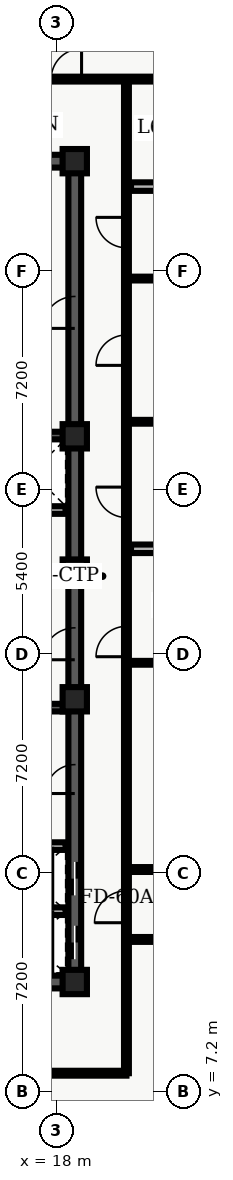
"""IFC4 building model, lengths in metres.
Left out: names, types, materials, properties, quantities, classifications, styles, units other than length and angle.
Written with IfcOpenShell. Run it as: python <this file> out.ifc"""

import sys

from ifc_helpers import new_model, entity, si_unit, converted_unit, direction, frame, origin_with_axes, origin_2d_with_axis, place, context, subcontext, project, spatial, polyline, rectangle, outline, extrude, element, fill, save


model = new_model("IFC4")
c1 = context("Model", 3, precision=1e-05, world=origin_with_axes(), true_north=direction((0.0, 1.0)))
c2 = subcontext(c1, "Body", "Model", "MODEL_VIEW")
j1 = project(units=[si_unit("LENGTHUNIT", "METRE"), converted_unit("PLANEANGLEUNIT", "DEGREE", entity("IfcPlaneAngleMeasure", 0.017), si_unit("PLANEANGLEUNIT", "RADIAN"), dimensions=[0, 0, 0, 0, 0, 0, 0])], contexts=[c1])
p1 = place(None, origin_with_axes())
s1 = spatial("IfcSite", under=j1, at=p1, CompositionType="ELEMENT")
p2 = place(p1, origin_with_axes())
s2 = spatial("IfcBuilding", under=s1, at=p2, CompositionType="ELEMENT")
p3 = place(p2, frame((0.0, 0.0, 264.6), z_axis=(0.0, 0.0, 1.0), x_axis=(1.0, 0.0, 0.0)))
s3 = spatial("IfcBuildingStorey", under=s2, at=p3, CompositionType="ELEMENT", Elevation=264.6)
p4 = place(p3, frame((11.4, 10.8, 0.0), z_axis=(0.0, 0.0, 1.0), x_axis=(1.0, 0.0, 0.0)))
e1 = element("IfcWall", 1, at=p4, inside=s3, PredefinedType="SHEAR", context=c2, shape_type="SweptSolid", body=[
    extrude(outline(polyline([(0.0, -0.21), (7.2, -0.21), (7.2, 0.21), (0.0, 0.21), (0.0, -0.21)])), origin_with_axes(), (0.0, 0.0, 1.0), 3.66),
])
p5 = place(p4, frame((2.625, 0.0, 0.0), z_axis=(0.0, 0.0, 1.0), x_axis=(1.0, 0.0, 0.0)))
e2 = element("IfcOpeningElement", 2, at=p5, cuts=e1, PredefinedType="OPENING", context=c2, shape_type="SweptSolid", body=[
    extrude(rectangle(XDim=1.05, YDim=0.44, at=origin_2d_with_axis()), origin_with_axes(), (0.0, 0.0, 1.0), 2.15),
])
p6 = place(p3, frame((11.4, 37.8, 0.0), z_axis=(0.0, 0.0, 1.0), x_axis=(1.0, 0.0, 0.0)))
e3 = element("IfcWall", 3, at=p6, inside=s3, PredefinedType="SHEAR", context=c2, shape_type="SweptSolid", body=[
    extrude(outline(polyline([(0.0, -0.21), (7.2, -0.21), (7.2, 0.21), (0.0, 0.21), (0.0, -0.21)])), origin_with_axes(), (0.0, 0.0, 1.0), 3.66),
])
p7 = place(p6, frame((2.625, 0.0, 0.0), z_axis=(0.0, 0.0, 1.0), x_axis=(1.0, 0.0, 0.0)))
e4 = element("IfcOpeningElement", 4, at=p7, cuts=e3, PredefinedType="OPENING", context=c2, shape_type="SweptSolid", body=[
    extrude(rectangle(XDim=1.05, YDim=0.44, at=origin_2d_with_axis()), origin_with_axes(), (0.0, 0.0, 1.0), 2.15),
])
p8 = place(p3, frame((18.6, 10.8, 0.0), z_axis=(0.0, 0.0, 1.0), x_axis=(0.0, 1.0, 0.0)))
e5 = element("IfcWall", 5, at=p8, inside=s3, PredefinedType="SHEAR", context=c2, shape_type="SweptSolid", body=[
    extrude(outline(polyline([(0.0, -0.21), (13.5, -0.21), (13.5, 0.21), (0.0, 0.21), (0.0, -0.21)])), origin_with_axes(), (0.0, 0.0, 1.0), 3.66),
])
p9 = place(p8, frame((1.3, 0.0, 0.0), z_axis=(0.0, 0.0, 1.0), x_axis=(1.0, 0.0, 0.0)))
e6 = element("IfcOpeningElement", 6, at=p9, cuts=e5, PredefinedType="OPENING", context=c2, shape_type="SweptSolid", body=[
    extrude(rectangle(XDim=1.1, YDim=0.44, at=origin_2d_with_axis()), origin_with_axes(), (0.0, 0.0, 1.0), 2.15),
])
p10 = place(p8, frame((3.4, 0.0, 0.0), z_axis=(0.0, 0.0, 1.0), x_axis=(1.0, 0.0, 0.0)))
e7 = element("IfcOpeningElement", 7, at=p10, cuts=e5, PredefinedType="OPENING", context=c2, shape_type="SweptSolid", body=[
    extrude(rectangle(XDim=1.1, YDim=0.44, at=origin_2d_with_axis()), origin_with_axes(), (0.0, 0.0, 1.0), 2.15),
])
p11 = place(p8, frame((11.125, 0.0, 0.0), z_axis=(0.0, 0.0, 1.0), x_axis=(1.0, 0.0, 0.0)))
e8 = element("IfcOpeningElement", 8, at=p11, cuts=e5, PredefinedType="OPENING", context=c2, shape_type="SweptSolid", body=[
    extrude(rectangle(XDim=1.05, YDim=0.44, at=origin_2d_with_axis()), origin_with_axes(), (0.0, 0.0, 1.0), 2.15),
])
p12 = place(p8, frame((6.675, 0.0, 0.0), z_axis=(0.0, 0.0, 1.0), x_axis=(1.0, 0.0, 0.0)))
e9 = element("IfcOpeningElement", 9, at=p12, cuts=e5, PredefinedType="OPENING", context=c2, shape_type="SweptSolid", body=[
    extrude(rectangle(XDim=0.95, YDim=0.44, at=origin_2d_with_axis()), origin_with_axes(), (0.0, 0.0, 1.0), 2.15),
])
p13 = place(p3, frame((18.6, 24.3, 0.0), z_axis=(0.0, 0.0, 1.0), x_axis=(0.0, 1.0, 0.0)))
e10 = element("IfcWall", 10, at=p13, inside=s3, PredefinedType="SHEAR", context=c2, shape_type="SweptSolid", body=[
    extrude(outline(polyline([(0.0, -0.21), (13.5, -0.21), (13.5, 0.21), (0.0, 0.21), (0.0, -0.21)])), origin_with_axes(), (0.0, 0.0, 1.0), 3.66),
])
p14 = place(p13, frame((8.525, 0.0, 0.0), z_axis=(0.0, 0.0, 1.0), x_axis=(1.0, 0.0, 0.0)))
e11 = element("IfcOpeningElement", 11, at=p14, cuts=e10, PredefinedType="OPENING", context=c2, shape_type="SweptSolid", body=[
    extrude(rectangle(XDim=1.05, YDim=0.44, at=origin_2d_with_axis()), origin_with_axes(), (0.0, 0.0, 1.0), 2.15),
])
for number, where, z_axis, x_axis in (
    (12, (11.61, 19.825, 0.0), (0.0, 0.0, 1.0), (1.0, 0.0, 0.0)),
    (13, (11.61, 28.775, 0.0), (0.0, 0.0, 1.0), (1.0, 0.0, 0.0)),
):
    element("IfcWall", number, at=place(p3, frame(where, z_axis=z_axis, x_axis=x_axis)), inside=s3, PredefinedType="SHEAR", context=c2, shape_type="SweptSolid", body=[
        extrude(outline(polyline([(0.0, -0.125), (6.78, -0.125), (6.78, 0.125), (0.0, 0.125), (0.0, -0.125)])), origin_with_axes(), (0.0, 0.0, 1.0), 3.66),
    ])
p15 = place(p3, frame((11.7, 24.1, 0.0), z_axis=(0.0, 0.0, 1.0), x_axis=(1.0, 0.0, 0.0)))
e14 = element("IfcWall", 14, at=p15, inside=s3, PredefinedType="SOLIDWALL", context=c2, shape_type="SweptSolid", body=[
    extrude(outline(polyline([(0.0, -0.125), (6.6, -0.125), (6.6, 0.125), (0.0, 0.125), (0.0, -0.125)])), origin_with_axes(), (0.0, 0.0, 1.0), 2.7),
])
p16 = place(p15, frame((3.75, 0.0, 0.0), z_axis=(0.0, 0.0, 1.0), x_axis=(1.0, 0.0, 0.0)))
e15 = element("IfcOpeningElement", 15, at=p16, cuts=e14, PredefinedType="OPENING", context=c2, shape_type="SweptSolid", body=[
    extrude(rectangle(XDim=0.9, YDim=0.27, at=origin_2d_with_axis()), origin_with_axes(), (0.0, 0.0, 1.0), 2.15),
])
p17 = place(p3, frame((11.7, 26.325, 0.0), z_axis=(0.0, 0.0, 1.0), x_axis=(1.0, 0.0, 0.0)))
e16 = element("IfcWall", 16, at=p17, inside=s3, PredefinedType="SOLIDWALL", context=c2, shape_type="SweptSolid", body=[
    extrude(outline(polyline([(0.0, -0.125), (6.6, -0.125), (6.6, 0.125), (0.0, 0.125), (0.0, -0.125)])), origin_with_axes(), (0.0, 0.0, 1.0), 2.7),
])
p18 = place(p17, frame((3.5, 0.0, 0.0), z_axis=(0.0, 0.0, 1.0), x_axis=(1.0, 0.0, 0.0)))
e17 = element("IfcOpeningElement", 17, at=p18, cuts=e16, PredefinedType="OPENING", context=c2, shape_type="SweptSolid", body=[
    extrude(rectangle(XDim=0.9, YDim=0.27, at=origin_2d_with_axis()), origin_with_axes(), (0.0, 0.0, 1.0), 2.15),
])
for number, where, z_axis, x_axis in (
    (18, (18.6, 10.8, 0.0), (0.0, 0.0, 1.0), (1.0, 0.0, 0.0)),
    (19, (18.6, 20.1, 0.0), (0.0, 0.0, 1.0), (1.0, 0.0, 0.0)),
    (20, (18.6, 24.3, 0.0), (0.0, 0.0, 1.0), (1.0, 0.0, 0.0)),
    (21, (18.6, 28.75, 0.0), (0.0, 0.0, 1.0), (1.0, 0.0, 0.0)),
    (22, (18.6, 37.8, 0.0), (0.0, 0.0, 1.0), (1.0, 0.0, 0.0)),
):
    element("IfcColumn", number, at=place(p3, frame(where, z_axis=z_axis, x_axis=x_axis)), inside=s3, PredefinedType="COLUMN", context=c2, shape_type="SweptSolid", body=[
        extrude(rectangle(XDim=0.8, YDim=0.8, at=origin_2d_with_axis()), origin_with_axes(), (0.0, 0.0, 1.0), 3.9),
    ])
for number, where, z_axis, x_axis in (
    (23, (15.84, 13.13, 0.0), (0.0, 0.0, 1.0), (1.0, 0.0, 0.0)),
    (24, (15.84, 15.27, 0.0), (0.0, 0.0, 1.0), (1.0, 0.0, 0.0)),
):
    element("IfcWall", number, at=place(p3, frame(where, z_axis=z_axis, x_axis=x_axis)), inside=s3, PredefinedType="SOLIDWALL", context=c2, shape_type="SweptSolid", body=[
        extrude(outline(polyline([(0.0, -0.125), (2.46, -0.125), (2.46, 0.125), (0.0, 0.125), (0.0, -0.125)])), origin_with_axes(), (0.0, 0.0, 1.0), 2.7),
    ])
p19 = place(p3, frame((8.135, 7.8, 0.0), z_axis=(0.0, 0.0, 1.0), x_axis=(1.0, 0.0, 0.0)))
e25 = element("IfcWall", 25, at=p19, inside=s3, PredefinedType="PARTITIONING", context=c2, shape_type="SweptSolid", body=[
    extrude(outline(polyline([(0.0, -0.08), (12.165, -0.08), (12.165, 0.08), (0.0, 0.08), (0.0, -0.08)])), origin_with_axes(), (0.0, 0.0, 1.0), 2.7),
])
p20 = place(p19, frame((3.994, 0.0, 0.0), z_axis=(0.0, 0.0, 1.0), x_axis=(1.0, 0.0, 0.0)))
e26 = element("IfcOpeningElement", 26, at=p20, cuts=e25, PredefinedType="OPENING", context=c2, shape_type="SweptSolid", body=[
    extrude(rectangle(XDim=1.0, YDim=0.18, at=origin_2d_with_axis()), origin_with_axes(), (0.0, 0.0, 1.0), 2.15),
])
p21 = place(p19, frame((8.794, 0.0, 0.0), z_axis=(0.0, 0.0, 1.0), x_axis=(1.0, 0.0, 0.0)))
e27 = element("IfcOpeningElement", 27, at=p21, cuts=e25, PredefinedType="OPENING", context=c2, shape_type="SweptSolid", body=[
    extrude(rectangle(XDim=1.0, YDim=0.18, at=origin_2d_with_axis()), origin_with_axes(), (0.0, 0.0, 1.0), 2.15),
])
p22 = place(p3, frame((8.135, 40.5, 0.0), z_axis=(0.0, 0.0, 1.0), x_axis=(1.0, 0.0, 0.0)))
e28 = element("IfcWall", 28, at=p22, inside=s3, PredefinedType="PARTITIONING", context=c2, shape_type="SweptSolid", body=[
    extrude(outline(polyline([(0.0, -0.08), (23.93, -0.08), (23.93, 0.08), (0.0, 0.08), (0.0, -0.08)])), origin_with_axes(), (0.0, 0.0, 1.0), 2.7),
])
p23 = place(p22, frame((0.76, 0.0, 0.0), z_axis=(0.0, 0.0, 1.0), x_axis=(1.0, 0.0, 0.0)))
e29 = element("IfcOpeningElement", 29, at=p23, cuts=e28, PredefinedType="OPENING", context=c2, shape_type="SweptSolid", body=[
    extrude(rectangle(XDim=1.0, YDim=0.18, at=origin_2d_with_axis()), origin_with_axes(), (0.0, 0.0, 1.0), 2.15),
])
p24 = place(p22, frame((4.729, 0.0, 0.0), z_axis=(0.0, 0.0, 1.0), x_axis=(1.0, 0.0, 0.0)))
e30 = element("IfcOpeningElement", 30, at=p24, cuts=e28, PredefinedType="OPENING", context=c2, shape_type="SweptSolid", body=[
    extrude(rectangle(XDim=1.0, YDim=0.18, at=origin_2d_with_axis()), origin_with_axes(), (0.0, 0.0, 1.0), 2.15),
])
p25 = place(p22, frame((7.574, 0.0, 0.0), z_axis=(0.0, 0.0, 1.0), x_axis=(1.0, 0.0, 0.0)))
e31 = element("IfcOpeningElement", 31, at=p25, cuts=e28, PredefinedType="OPENING", context=c2, shape_type="SweptSolid", body=[
    extrude(rectangle(XDim=1.0, YDim=0.18, at=origin_2d_with_axis()), origin_with_axes(), (0.0, 0.0, 1.0), 2.15),
])
p26 = place(p22, frame((10.189, 0.0, 0.0), z_axis=(0.0, 0.0, 1.0), x_axis=(1.0, 0.0, 0.0)))
e32 = element("IfcOpeningElement", 32, at=p26, cuts=e28, PredefinedType="OPENING", context=c2, shape_type="SweptSolid", body=[
    extrude(rectangle(XDim=1.0, YDim=0.18, at=origin_2d_with_axis()), origin_with_axes(), (0.0, 0.0, 1.0), 2.15),
])
p27 = place(p3, frame((20.3, 7.8, 0.0), z_axis=(0.0, 0.0, 1.0), x_axis=(0.0, 1.0, 0.0)))
e33 = element("IfcWall", 33, at=p27, inside=s3, PredefinedType="PARTITIONING", context=c2, shape_type="SweptSolid", body=[
    extrude(outline(polyline([(0.0, -0.08), (32.7, -0.08), (32.7, 0.08), (0.0, 0.08), (0.0, -0.08)])), origin_with_axes(), (0.0, 0.0, 1.0), 2.7),
])
p28 = place(p27, frame((14.2, 0.0, 0.0), z_axis=(0.0, 0.0, 1.0), x_axis=(1.0, 0.0, 0.0)))
e34 = element("IfcOpeningElement", 34, at=p28, cuts=e33, PredefinedType="OPENING", context=c2, shape_type="SweptSolid", body=[
    extrude(rectangle(XDim=1.0, YDim=0.18, at=origin_2d_with_axis()), origin_with_axes(), (0.0, 0.0, 1.0), 2.15),
])
p29 = place(p27, frame((18.779, 0.0, 0.0), z_axis=(0.0, 0.0, 1.0), x_axis=(1.0, 0.0, 0.0)))
e35 = element("IfcOpeningElement", 35, at=p29, cuts=e33, PredefinedType="OPENING", context=c2, shape_type="SweptSolid", body=[
    extrude(rectangle(XDim=1.0, YDim=0.18, at=origin_2d_with_axis()), origin_with_axes(), (0.0, 0.0, 1.0), 2.15),
])
p30 = place(p27, frame((23.784, 0.0, 0.0), z_axis=(0.0, 0.0, 1.0), x_axis=(1.0, 0.0, 0.0)))
e36 = element("IfcOpeningElement", 36, at=p30, cuts=e33, PredefinedType="OPENING", context=c2, shape_type="SweptSolid", body=[
    extrude(rectangle(XDim=1.0, YDim=0.18, at=origin_2d_with_axis()), origin_with_axes(), (0.0, 0.0, 1.0), 2.15),
])
p31 = place(p27, frame((27.651, 0.0, 0.0), z_axis=(0.0, 0.0, 1.0), x_axis=(1.0, 0.0, 0.0)))
e37 = element("IfcOpeningElement", 37, at=p31, cuts=e33, PredefinedType="OPENING", context=c2, shape_type="SweptSolid", body=[
    extrude(rectangle(XDim=1.0, YDim=0.18, at=origin_2d_with_axis()), origin_with_axes(), (0.0, 0.0, 1.0), 2.15),
])
p32 = place(p27, frame((5.475, 0.0, 0.0), z_axis=(0.0, 0.0, 1.0), x_axis=(1.0, 0.0, 0.0)))
e38 = element("IfcOpeningElement", 38, at=p32, cuts=e33, PredefinedType="OPENING", context=c2, shape_type="SweptSolid", body=[
    extrude(rectangle(XDim=1.05, YDim=0.18, at=origin_2d_with_axis()), origin_with_axes(), (0.0, 0.0, 1.0), 2.15),
])
p33 = place(p3, frame((20.45, 25.05, 0.0), z_axis=(0.0, 0.0, 1.0), x_axis=(1.0, 0.0, 0.0)))
e39 = element("IfcWall", 39, at=p33, inside=s3, PredefinedType="PARTITIONING", context=c2, shape_type="SweptSolid", body=[
    extrude(outline(polyline([(0.0, -0.14), (11.615, -0.14), (11.615, 0.14), (0.0, 0.14), (0.0, -0.14)])), origin_with_axes(), (0.0, 0.0, 1.0), 2.7),
])
for number, where, z_axis, x_axis in (
    (40, (20.45, 29.228, 0.0), (0.0, 0.0, 1.0), (1.0, 0.0, 0.0)),
    (41, (20.45, 33.939, 0.0), (0.0, 0.0, 1.0), (1.0, 0.0, 0.0)),
):
    element("IfcWall", number, at=place(p3, frame(where, z_axis=z_axis, x_axis=x_axis)), inside=s3, PredefinedType="PARTITIONING", context=c2, shape_type="SweptSolid", body=[
        extrude(outline(polyline([(0.0, -0.062), (11.615, -0.062), (11.615, 0.062), (0.0, 0.062), (0.0, -0.062)])), origin_with_axes(), (0.0, 0.0, 1.0), 2.7),
    ])
p34 = place(p3, frame((20.45, 36.964, 0.0), z_axis=(0.0, 0.0, 1.0), x_axis=(1.0, 0.0, 0.0)))
e42 = element("IfcWall", 42, at=p34, inside=s3, PredefinedType="PARTITIONING", context=c2, shape_type="SweptSolid", body=[
    extrude(outline(polyline([(0.0, -0.14), (11.615, -0.14), (11.615, 0.14), (0.0, 0.14), (0.0, -0.14)])), origin_with_axes(), (0.0, 0.0, 1.0), 2.7),
])
p35 = place(p34, frame((3.375, 0.0, 0.0), z_axis=(0.0, 0.0, 1.0), x_axis=(1.0, 0.0, 0.0)))
e43 = element("IfcOpeningElement", 43, at=p35, cuts=e42, PredefinedType="OPENING", context=c2, shape_type="SweptSolid", body=[
    extrude(rectangle(XDim=0.95, YDim=0.3, at=origin_2d_with_axis()), origin_with_axes(), (0.0, 0.0, 1.0), 2.15),
])
p36 = place(p3, frame((20.3, 12.2, 0.0), z_axis=(0.0, 0.0, 1.0), x_axis=(1.0, 0.0, 0.0)))
e44 = element("IfcWall", 44, at=p36, inside=s3, PredefinedType="PARTITIONING", context=c2, shape_type="SweptSolid", body=[
    extrude(outline(polyline([(0.0, -0.08), (14.85, -0.08), (14.85, 0.08), (0.0, 0.08), (0.0, -0.08)])), origin_with_axes(), (0.0, 0.0, 1.0), 2.7),
])
p37 = place(p36, frame((8.355, 0.0, 0.0), z_axis=(0.0, 0.0, 1.0), x_axis=(1.0, 0.0, 0.0)))
e45 = element("IfcOpeningElement", 45, at=p37, cuts=e44, PredefinedType="OPENING", context=c2, shape_type="SweptSolid", body=[
    extrude(rectangle(XDim=1.0, YDim=0.18, at=origin_2d_with_axis()), origin_with_axes(), (0.0, 0.0, 1.0), 2.15),
])
p38 = place(p3, frame((20.3, 14.5, 0.0), z_axis=(0.0, 0.0, 1.0), x_axis=(1.0, 0.0, 0.0)))
e46 = element("IfcWall", 46, at=p38, inside=s3, PredefinedType="PARTITIONING", context=c2, shape_type="SweptSolid", body=[
    extrude(outline(polyline([(0.0, -0.08), (14.85, -0.08), (14.85, 0.08), (0.0, 0.08), (0.0, -0.08)])), origin_with_axes(), (0.0, 0.0, 1.0), 2.7),
])
p39 = place(p38, frame((1.739, 0.0, 0.0), z_axis=(0.0, 0.0, 1.0), x_axis=(1.0, 0.0, 0.0)))
e47 = element("IfcOpeningElement", 47, at=p39, cuts=e46, PredefinedType="OPENING", context=c2, shape_type="SweptSolid", body=[
    extrude(rectangle(XDim=1.0, YDim=0.18, at=origin_2d_with_axis()), origin_with_axes(), (0.0, 0.0, 1.0), 2.15),
])
p40 = place(p38, frame((5.299, 0.0, 0.0), z_axis=(0.0, 0.0, 1.0), x_axis=(1.0, 0.0, 0.0)))
e48 = element("IfcOpeningElement", 48, at=p40, cuts=e46, PredefinedType="OPENING", context=c2, shape_type="SweptSolid", body=[
    extrude(rectangle(XDim=1.0, YDim=0.18, at=origin_2d_with_axis()), origin_with_axes(), (0.0, 0.0, 1.0), 2.15),
])
p41 = place(p38, frame((8.889, 0.0, 0.0), z_axis=(0.0, 0.0, 1.0), x_axis=(1.0, 0.0, 0.0)))
e49 = element("IfcOpeningElement", 49, at=p41, cuts=e46, PredefinedType="OPENING", context=c2, shape_type="SweptSolid", body=[
    extrude(rectangle(XDim=1.0, YDim=0.18, at=origin_2d_with_axis()), origin_with_axes(), (0.0, 0.0, 1.0), 2.15),
])
p42 = place(p38, frame((12.624, 0.0, 0.0), z_axis=(0.0, 0.0, 1.0), x_axis=(1.0, 0.0, 0.0)))
e50 = element("IfcOpeningElement", 50, at=p42, cuts=e46, PredefinedType="OPENING", context=c2, shape_type="SweptSolid", body=[
    extrude(rectangle(XDim=1.0, YDim=0.18, at=origin_2d_with_axis()), origin_with_axes(), (0.0, 0.0, 1.0), 2.15),
])
p43 = place(p3, frame((20.3, 21.3, 0.0), z_axis=(0.0, 0.0, 1.0), x_axis=(1.0, 0.0, 0.0)))
e51 = element("IfcWall", 51, at=p43, inside=s3, PredefinedType="PARTITIONING", context=c2, shape_type="SweptSolid", body=[
    extrude(outline(polyline([(0.0, -0.062), (11.765, -0.062), (11.765, 0.062), (0.0, 0.062), (0.0, -0.062)])), origin_with_axes(), (0.0, 0.0, 1.0), 2.7),
])
p44 = place(p8, frame((1.3, 0.0, 0.0), z_axis=(0.0, 0.0, 1.0), x_axis=(1.0, 0.0, 0.0)))
e52 = element("IfcDoor", 52, at=p44, inside=s3, OperationType="SLIDING_TO_LEFT", PredefinedType="DOOR", context=c2, shape_type="SweptSolid", body=[
    extrude(rectangle(XDim=1.1, YDim=0.09, at=origin_2d_with_axis()), origin_with_axes(), (0.0, 0.0, 1.0), 2.15),
])
fill(e6, e52)
p45 = place(p8, frame((3.4, 0.0, 0.0), z_axis=(0.0, 0.0, 1.0), x_axis=(1.0, 0.0, 0.0)))
e53 = element("IfcDoor", 53, at=p45, inside=s3, OperationType="SLIDING_TO_RIGHT", PredefinedType="DOOR", context=c2, shape_type="SweptSolid", body=[
    extrude(rectangle(XDim=1.1, YDim=0.09, at=origin_2d_with_axis()), origin_with_axes(), (0.0, 0.0, 1.0), 2.15),
])
fill(e7, e53)
p46 = place(p8, frame((11.125, 0.0, 0.0), z_axis=(0.0, 0.0, 1.0), x_axis=(1.0, 0.0, 0.0)))
e54 = element("IfcDoor", 54, at=p46, inside=s3, OperationType="SINGLE_SWING_LEFT", PredefinedType="DOOR", context=c2, shape_type="SweptSolid", body=[
    extrude(rectangle(XDim=1.05, YDim=0.09, at=origin_2d_with_axis()), origin_with_axes(), (0.0, 0.0, 1.0), 2.15),
])
fill(e8, e54)
p47 = place(p8, frame((6.675, 0.0, 0.0), z_axis=(0.0, 0.0, 1.0), x_axis=(1.0, 0.0, 0.0)))
e55 = element("IfcDoor", 55, at=p47, inside=s3, OperationType="SINGLE_SWING_LEFT", PredefinedType="DOOR", context=c2, shape_type="SweptSolid", body=[
    extrude(rectangle(XDim=0.95, YDim=0.09, at=origin_2d_with_axis()), origin_with_axes(), (0.0, 0.0, 1.0), 2.15),
])
fill(e9, e55)
p48 = place(p13, frame((8.525, 0.0, 0.0), z_axis=(0.0, 0.0, 1.0), x_axis=(1.0, 0.0, 0.0)))
e56 = element("IfcDoor", 56, at=p48, inside=s3, OperationType="SINGLE_SWING_LEFT", PredefinedType="DOOR", context=c2, shape_type="SweptSolid", body=[
    extrude(rectangle(XDim=1.05, YDim=0.09, at=origin_2d_with_axis()), origin_with_axes(), (0.0, 0.0, 1.0), 2.15),
])
fill(e11, e56)
p49 = place(p22, frame((10.189, 0.0, 0.0), z_axis=(0.0, 0.0, 1.0), x_axis=(1.0, 0.0, 0.0)))
e57 = element("IfcDoor", 57, at=p49, inside=s3, OperationType="SINGLE_SWING_RIGHT", PredefinedType="DOOR", context=c2, shape_type="SweptSolid", body=[
    extrude(rectangle(XDim=1.0, YDim=0.09, at=origin_2d_with_axis()), origin_with_axes(), (0.0, 0.0, 1.0), 2.15),
])
fill(e32, e57)
p50 = place(p27, frame((14.2, 0.0, 0.0), z_axis=(0.0, 0.0, 1.0), x_axis=(1.0, 0.0, 0.0)))
e58 = element("IfcDoor", 58, at=p50, inside=s3, OperationType="SINGLE_SWING_LEFT", PredefinedType="DOOR", context=c2, shape_type="SweptSolid", body=[
    extrude(rectangle(XDim=1.0, YDim=0.09, at=origin_2d_with_axis()), origin_with_axes(), (0.0, 0.0, 1.0), 2.15),
])
fill(e34, e58)
p51 = place(p27, frame((18.779, 0.0, 0.0), z_axis=(0.0, 0.0, 1.0), x_axis=(1.0, 0.0, 0.0)))
e59 = element("IfcDoor", 59, at=p51, inside=s3, OperationType="SINGLE_SWING_RIGHT", PredefinedType="DOOR", context=c2, shape_type="SweptSolid", body=[
    extrude(rectangle(XDim=1.0, YDim=0.09, at=origin_2d_with_axis()), origin_with_axes(), (0.0, 0.0, 1.0), 2.15),
])
fill(e35, e59)
p52 = place(p27, frame((23.784, 0.0, 0.0), z_axis=(0.0, 0.0, 1.0), x_axis=(1.0, 0.0, 0.0)))
e60 = element("IfcDoor", 60, at=p52, inside=s3, OperationType="SINGLE_SWING_LEFT", PredefinedType="DOOR", context=c2, shape_type="SweptSolid", body=[
    extrude(rectangle(XDim=1.0, YDim=0.09, at=origin_2d_with_axis()), origin_with_axes(), (0.0, 0.0, 1.0), 2.15),
])
fill(e36, e60)
p53 = place(p27, frame((27.651, 0.0, 0.0), z_axis=(0.0, 0.0, 1.0), x_axis=(1.0, 0.0, 0.0)))
e61 = element("IfcDoor", 61, at=p53, inside=s3, OperationType="SINGLE_SWING_RIGHT", PredefinedType="DOOR", context=c2, shape_type="SweptSolid", body=[
    extrude(rectangle(XDim=1.0, YDim=0.09, at=origin_2d_with_axis()), origin_with_axes(), (0.0, 0.0, 1.0), 2.15),
])
fill(e37, e61)
p54 = place(p27, frame((5.475, 0.0, 0.0), z_axis=(0.0, 0.0, 1.0), x_axis=(1.0, 0.0, 0.0)))
e62 = element("IfcDoor", 62, at=p54, inside=s3, OperationType="SINGLE_SWING_LEFT", PredefinedType="DOOR", context=c2, shape_type="SweptSolid", body=[
    extrude(rectangle(XDim=1.05, YDim=0.09, at=origin_2d_with_axis()), origin_with_axes(), (0.0, 0.0, 1.0), 2.15),
])
fill(e38, e62)
save(model, sys.argv[1])
